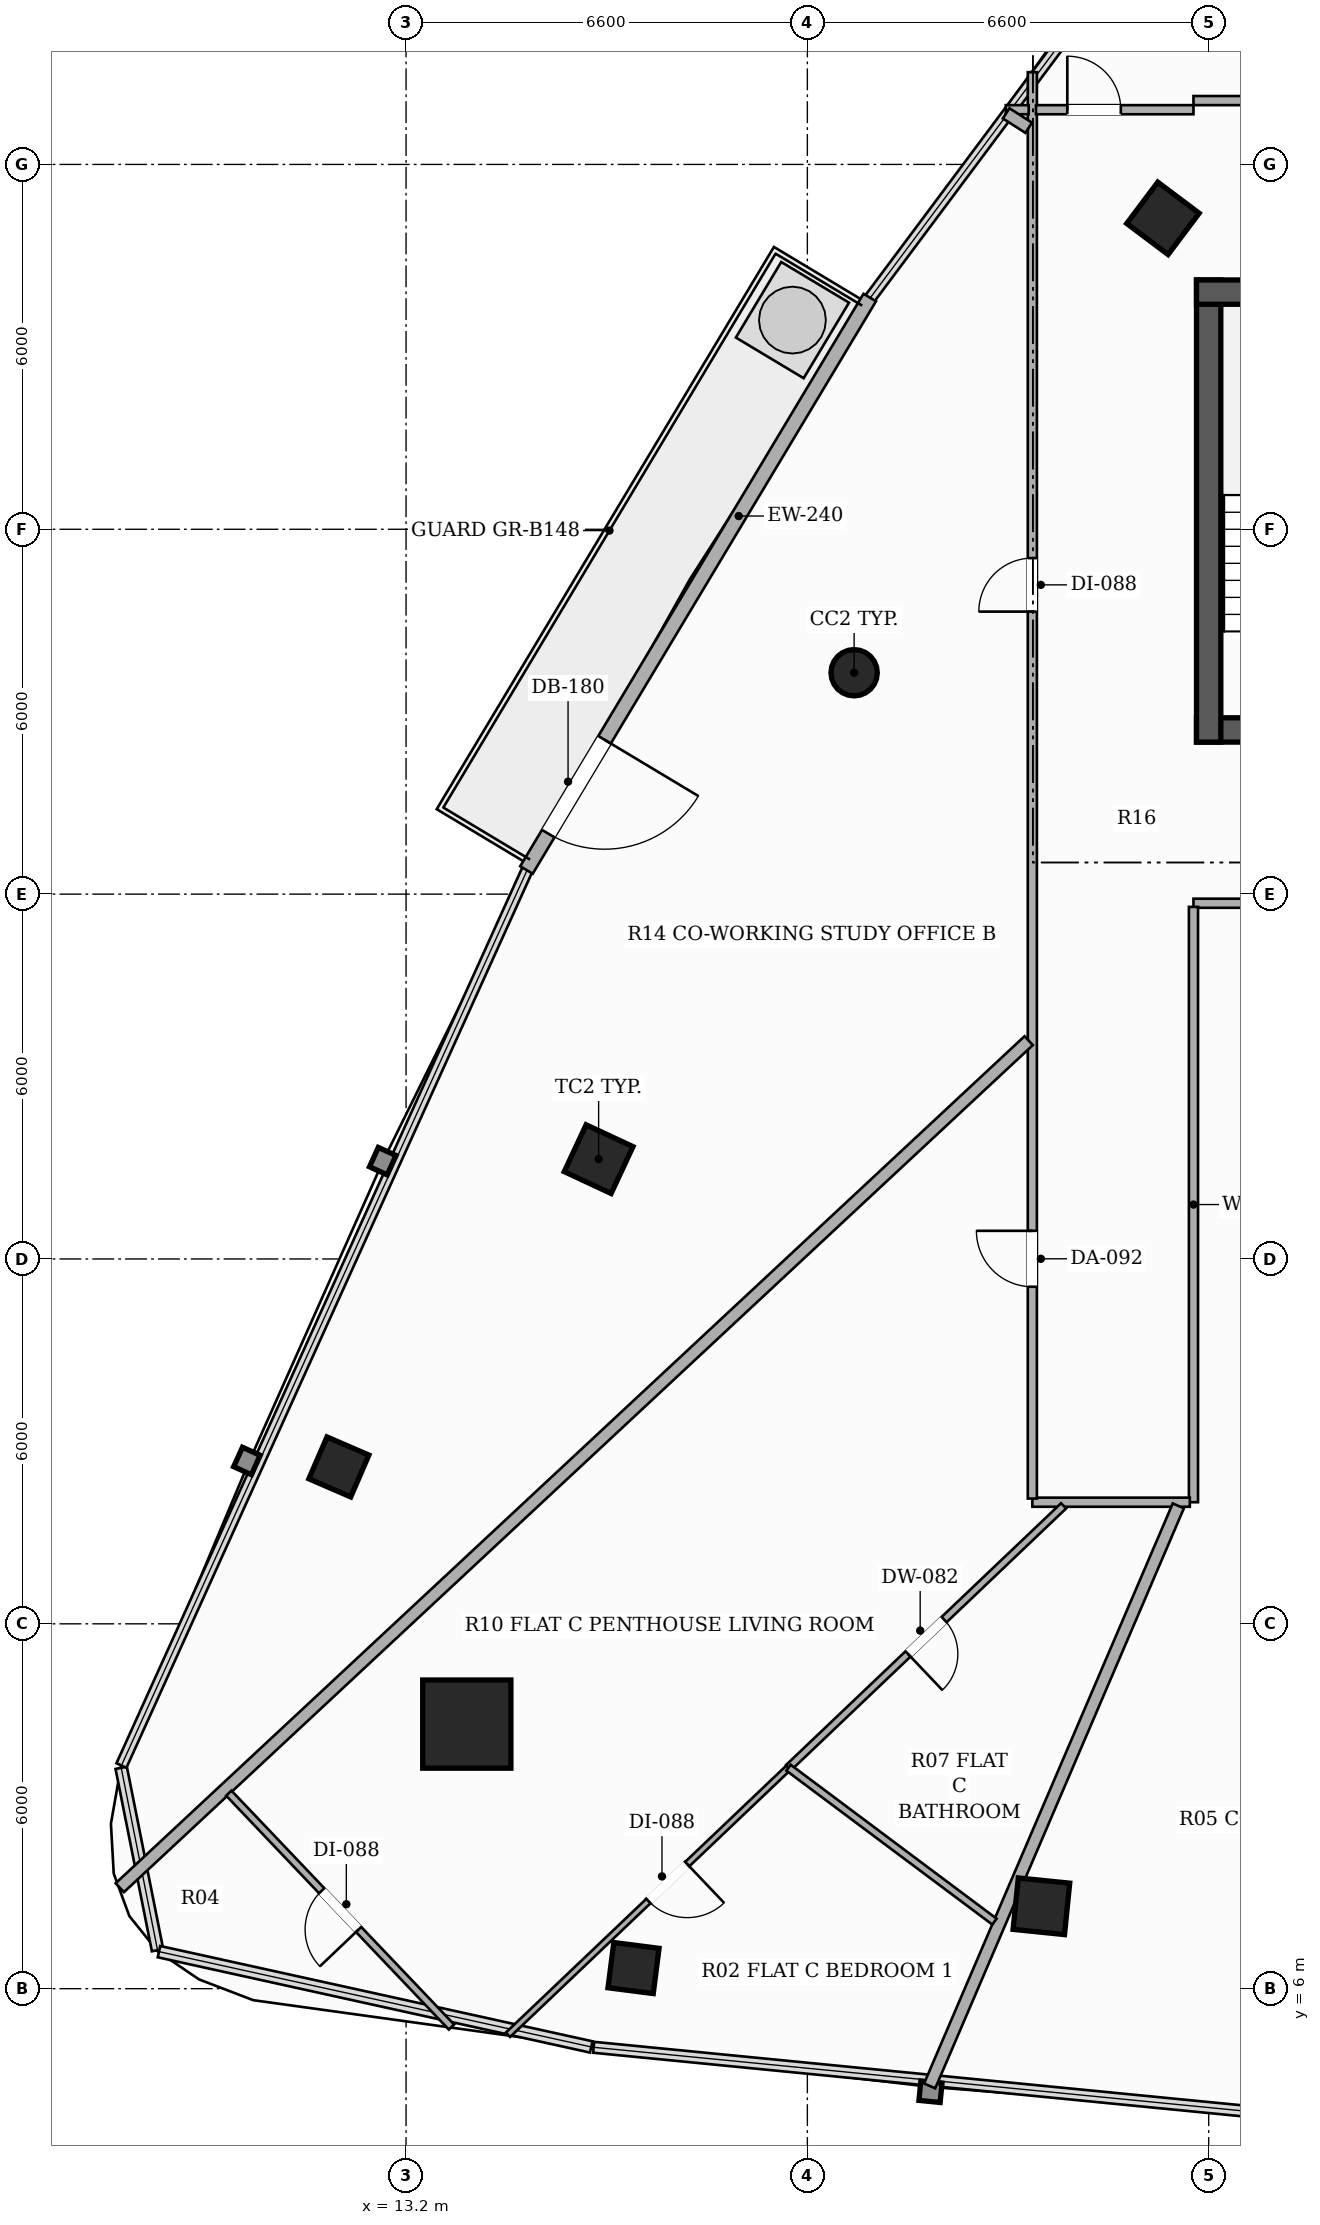
"""IFC4 building model, lengths in metres.
Left out: names, types, materials, properties, quantities, classifications, styles, units other than length and angle.
Written with IfcOpenShell. Run it as: python <this file> out.ifc"""

import sys

from ifc_helpers import new_model, si_unit, direction, frame, frame_2d, origin, origin_2d, place, context, subcontext, project, spatial, rectangle, hollow_rectangle, hollow_circle, extrude, element, fill, save


model = new_model("IFC4")
c1 = context("Model", 3, precision=1e-05, world=origin(), true_north=direction((0.0, 1.0)))
c2 = subcontext(c1, "Body", "Model", "MODEL_VIEW")
j1 = project(units=[si_unit("LENGTHUNIT", "METRE"), si_unit("PLANEANGLEUNIT", "RADIAN")], contexts=[c1])
p1 = place(None, origin())
s1 = spatial("IfcSite", under=j1, at=p1, CompositionType="ELEMENT")
p2 = place(p1, origin())
s2 = spatial("IfcBuilding", under=s1, at=p2, CompositionType="ELEMENT")
p3 = place(p2, frame((0.0, 0.0, 173.75)))
s3 = spatial("IfcBuildingStorey", under=s2, at=p3, CompositionType="ELEMENT", Elevation=173.75)
p4 = place(p3, frame((26.2, 26.7, 0.0), z_axis=(0.0, 0.0, 1.0), x_axis=(1.0, 0.0, 0.0)))
e1 = element("IfcWall", 1, at=p4, inside=s3, PredefinedType="SHEAR", context=c2, shape_type="SweptSolid", body=[
    extrude(rectangle(XDim=13.6, YDim=0.4, at=frame_2d((6.8, 0.0))), origin(), (0.0, 0.0, 1.0), 3.3),
])
p5 = place(p4, frame((4.35, 0.0, 0.0)))
e2 = element("IfcOpeningElement", 2, at=p5, cuts=e1, PredefinedType="OPENING", context=c2, shape_type="SweptSolid", body=[
    extrude(rectangle(XDim=1.05, YDim=2.15, at=frame_2d((0.525, 1.075))), frame((0.0, 0.21, 0.0), z_axis=(0.0, -1.0, 0.0), x_axis=(1.0, 0.0, 0.0)), (0.0, 0.0, 1.0), 0.42),
])
p6 = place(p4, frame((8.3, 0.0, 0.0)))
e3 = element("IfcOpeningElement", 3, at=p6, cuts=e1, PredefinedType="OPENING", context=c2, shape_type="SweptSolid", body=[
    extrude(rectangle(XDim=1.05, YDim=2.15, at=frame_2d((0.525, 1.075))), frame((0.0, 0.21, 0.0), z_axis=(0.0, -1.0, 0.0), x_axis=(1.0, 0.0, 0.0)), (0.0, 0.0, 1.0), 0.42),
])
p7 = place(p3, frame((26.4, 26.5, 0.0), z_axis=(0.0, 0.0, 1.0), x_axis=(0.0, 1.0, 0.0)))
e4 = element("IfcWall", 4, at=p7, inside=s3, PredefinedType="SHEAR", context=c2, shape_type="SweptSolid", body=[
    extrude(rectangle(XDim=7.6, YDim=0.4, at=frame_2d((3.8, 0.0))), origin(), (0.0, 0.0, 1.0), 3.3),
])
p8 = place(p3, frame((26.2, 33.9, 0.0), z_axis=(0.0, 0.0, 1.0), x_axis=(1.0, 0.0, 0.0)))
e5 = element("IfcWall", 5, at=p8, inside=s3, PredefinedType="SHEAR", context=c2, shape_type="SweptSolid", body=[
    extrude(rectangle(XDim=3.68, YDim=0.4, at=frame_2d((1.84, 0.0))), origin(), (0.0, 0.0, 1.0), 3.3),
])
p9 = place(p3, frame((14.199, 10.351, 0.0), z_axis=(0.0, 0.0, 1.0), x_axis=(1.0, 0.0, 0.0)))
e6 = element("IfcColumn", 6, at=p9, inside=s3, PredefinedType="COLUMN", context=c2, shape_type="SweptSolid", body=[
    extrude(hollow_rectangle(XDim=1.45, YDim=1.45, WallThickness=0.045, at=origin_2d()), origin(), (0.0, 0.0, 1.0), 3.3),
])
p10 = place(p3, frame((25.648, 35.113, 0.0), z_axis=(0.0, 0.0, 1.0), x_axis=(0.600420225326, 0.799684658487, 0.0)))
e7 = element("IfcColumn", 7, at=p10, inside=s3, PredefinedType="COLUMN", context=c2, shape_type="SweptSolid", body=[
    extrude(hollow_rectangle(XDim=0.85, YDim=0.85, WallThickness=0.028, at=origin_2d()), origin(), (0.0, 0.0, 1.0), 3.3),
])
p11 = place(p3, frame((20.569, 27.641, 0.0), z_axis=(0.0, 0.0, 1.0), x_axis=(1.0, 0.0, 0.0)))
e8 = element("IfcColumn", 8, at=p11, inside=s3, PredefinedType="COLUMN", context=c2, shape_type="SweptSolid", body=[
    extrude(hollow_circle(Radius=0.381, WallThickness=0.022, at=origin_2d()), origin(), (0.0, 0.0, 1.0), 3.3),
])
for number, where, z_axis, x_axis in (
    (9, (16.367, 19.642, 0.0), (0.0, 0.0, 1.0), (0.423, 0.906, 0.0)),
    (10, (23.649, 7.355, 0.0), (0.0, 0.0, 1.0), (-0.995, 0.101, 0.0)),
):
    element("IfcColumn", number, at=place(p3, frame(where, z_axis=z_axis, x_axis=x_axis)), inside=s3, PredefinedType="COLUMN", context=c2, shape_type="SweptSolid", body=[
        extrude(hollow_rectangle(XDim=0.85, YDim=0.85, WallThickness=0.028, at=origin_2d()), origin(), (0.0, 0.0, 1.0), 3.3),
    ])
for number, where, z_axis, x_axis in (
    (11, (12.095, 14.58, 0.0), (0.0, 0.0, 1.0), (0.397, 0.918, 0.0)),
    (12, (16.941, 6.339, 0.0), (0.0, 0.0, 1.0), (-0.992, 0.127, 0.0)),
):
    element("IfcColumn", number, at=place(p3, frame(where, z_axis=z_axis, x_axis=x_axis)), inside=s3, PredefinedType="COLUMN", context=c2, shape_type="SweptSolid", body=[
        extrude(hollow_rectangle(XDim=0.75, YDim=0.75, WallThickness=0.025, at=origin_2d()), origin(), (0.0, 0.0, 1.0), 3.3),
    ])
p12 = place(p3, frame((20.826, 33.811, 0.0), z_axis=(0.0, 0.0, 1.0), x_axis=(-0.514332213488, -0.857591029669, 0.0)))
e13 = element("IfcWall", 13, at=p12, inside=s3, PredefinedType="SOLIDWALL", context=c2, shape_type="SweptSolid", body=[
    extrude(rectangle(XDim=10.977, YDim=0.24, at=frame_2d((5.489, 0.0))), origin(), (0.0, 0.0, 1.0), 2.624),
])
p13 = place(p12, frame((8.48, 0.0, 0.0)))
e14 = element("IfcOpeningElement", 14, at=p13, cuts=e13, PredefinedType="OPENING", context=c2, shape_type="SweptSolid", body=[
    extrude(rectangle(XDim=1.8, YDim=2.2, at=frame_2d((0.9, 1.1))), frame((0.0, 0.13, 0.0), z_axis=(0.0, -1.0, 0.0), x_axis=(1.0, 0.0, 0.0)), (0.0, 0.0, 1.0), 0.26),
])
p14 = place(p3, frame((31.935, 23.85, 0.0), z_axis=(0.0, 0.0, 1.0), x_axis=(-1.0, 0.0, 0.0)))
e15 = element("IfcWall", 15, at=p14, inside=s3, PredefinedType="PARTITIONING", context=c2, shape_type="SweptSolid", body=[
    extrude(rectangle(XDim=5.785, YDim=0.15, at=frame_2d((2.893, 0.0))), origin(), (0.0, 0.0, 1.0), 2.721),
])
p15 = place(p14, frame((0.905, 0.0, 0.0)))
e16 = element("IfcOpeningElement", 16, at=p15, cuts=e15, PredefinedType="OPENING", context=c2, shape_type="SweptSolid", body=[
    extrude(rectangle(XDim=0.88, YDim=2.1, at=frame_2d((0.44, 1.05))), frame((0.0, 0.085, 0.0), z_axis=(0.0, -1.0, 0.0), x_axis=(1.0, 0.0, 0.0)), (0.0, 0.0, 1.0), 0.17),
])
p16 = place(p3, frame((26.15, 23.79, 0.0), z_axis=(0.0, 0.0, 1.0), x_axis=(0.0, -1.0, 0.0)))
e17 = element("IfcWall", 17, at=p16, inside=s3, PredefinedType="PARTITIONING", context=c2, shape_type="SweptSolid", body=[
    extrude(rectangle(XDim=9.79, YDim=0.15, at=frame_2d((4.895, 0.0))), origin(), (0.0, 0.0, 1.0), 2.721),
])
p17 = place(p3, frame((26.09, 14.0, 0.0), z_axis=(0.0, 0.0, 1.0), x_axis=(-1.0, 0.0, 0.0)))
e18 = element("IfcWall", 18, at=p17, inside=s3, PredefinedType="PARTITIONING", context=c2, shape_type="SweptSolid", body=[
    extrude(rectangle(XDim=2.59, YDim=0.15, at=frame_2d((1.295, 0.0))), origin(), (0.0, 0.0, 1.0), 2.721),
])
p18 = place(p3, frame((23.5, 14.06, 0.0), z_axis=(0.0, 0.0, 1.0), x_axis=(0.0, 1.0, 0.0)))
e19 = element("IfcWall", 19, at=p18, inside=s3, PredefinedType="PARTITIONING", context=c2, shape_type="SweptSolid", body=[
    extrude(rectangle(XDim=23.457, YDim=0.15, at=frame_2d((11.729, 0.0))), origin(), (0.0, 0.0, 1.0), 2.413),
])
p19 = place(p18, frame((14.586, 0.0, 0.0)))
e20 = element("IfcOpeningElement", 20, at=p19, cuts=e19, PredefinedType="OPENING", context=c2, shape_type="SweptSolid", body=[
    extrude(rectangle(XDim=0.88, YDim=2.1, at=frame_2d((0.44, 1.05))), frame((0.0, 0.085, 0.0), z_axis=(0.0, -1.0, 0.0), x_axis=(1.0, 0.0, 0.0)), (0.0, 0.0, 1.0), 0.17),
])
p20 = place(p18, frame((3.483, 0.0, 0.0)))
e21 = element("IfcOpeningElement", 21, at=p20, cuts=e19, PredefinedType="OPENING", context=c2, shape_type="SweptSolid", body=[
    extrude(rectangle(XDim=0.92, YDim=2.15, at=frame_2d((0.46, 1.075))), frame((0.0, 0.085, 0.0), z_axis=(0.0, -1.0, 0.0), x_axis=(1.0, 0.0, 0.0)), (0.0, 0.0, 1.0), 0.17),
])
p21 = place(p3, frame((23.063, 36.9, 0.0), z_axis=(0.0, 0.0, 1.0), x_axis=(1.0, 0.0, 0.0)))
e22 = element("IfcWall", 22, at=p21, inside=s3, PredefinedType="PARTITIONING", context=c2, shape_type="SweptSolid", body=[
    extrude(rectangle(XDim=0.377, YDim=0.15, at=frame_2d((0.188, 0.0))), origin(), (0.0, 0.0, 1.0), 3.06),
])
p22 = place(p3, frame((23.56, 36.9, 0.0), z_axis=(0.0, 0.0, 1.0), x_axis=(1.0, 0.0, 0.0)))
e23 = element("IfcWall", 23, at=p22, inside=s3, PredefinedType="PARTITIONING", context=c2, shape_type="SweptSolid", body=[
    extrude(rectangle(XDim=2.59, YDim=0.15, at=frame_2d((1.295, 0.0))), origin(), (0.0, 0.0, 1.0), 2.413),
])
p23 = place(p22, frame((0.515, 0.0, 0.0)))
e24 = element("IfcOpeningElement", 24, at=p23, cuts=e23, PredefinedType="OPENING", context=c2, shape_type="SweptSolid", body=[
    extrude(rectangle(XDim=0.88, YDim=2.1, at=frame_2d((0.44, 1.05))), frame((0.0, 0.085, 0.0), z_axis=(0.0, -1.0, 0.0), x_axis=(1.0, 0.0, 0.0)), (0.0, 0.0, 1.0), 0.17),
])
p24 = place(p3, frame((26.15, 37.05, 0.0), z_axis=(0.0, 0.0, 1.0), x_axis=(1.0, 0.0, 0.0)))
e25 = element("IfcWall", 25, at=p24, inside=s3, PredefinedType="PARTITIONING", context=c2, shape_type="SweptSolid", body=[
    extrude(rectangle(XDim=2.0, YDim=0.15, at=frame_2d((1.0, 0.0))), origin(), (0.0, 0.0, 1.0), 2.413),
])
p25 = place(p3, frame((23.44, 21.59, 0.0), z_axis=(0.0, 0.0, 1.0), x_axis=(-0.731574776166, -0.681761209572, 0.0)))
e26 = element("IfcWall", 26, at=p25, inside=s3, PredefinedType="PARTITIONING", context=c2, shape_type="SweptSolid", body=[
    extrude(rectangle(XDim=20.433, YDim=0.2, at=frame_2d((10.216, 0.0))), origin(), (0.0, 0.0, 1.0), 2.413),
])
p26 = place(p3, frame((23.069, 36.84, 0.0), z_axis=(0.0, 0.0, 1.0), x_axis=(0.842563414195, -0.538597152852, 0.0)))
e27 = element("IfcWall", 27, at=p26, inside=s3, PredefinedType="PARTITIONING", context=c2, shape_type="SweptSolid", body=[
    extrude(rectangle(XDim=0.44, YDim=0.2, at=frame_2d((0.22, 0.0))), origin(), (0.0, 0.0, 1.0), 3.06),
])
p27 = place(p3, frame((25.901, 13.94, 0.0), z_axis=(0.0, 0.0, 1.0), x_axis=(-0.394055564824, -0.919086618242, 0.0)))
e28 = element("IfcWall", 28, at=p27, inside=s3, PredefinedType="PARTITIONING", context=c2, shape_type="SweptSolid", body=[
    extrude(rectangle(XDim=10.379, YDim=0.2, at=frame_2d((5.189, 0.0))), origin(), (0.0, 0.0, 1.0), 2.413),
])
p28 = place(p3, frame((24.014, 13.94, 0.0), z_axis=(0.0, 0.0, 1.0), x_axis=(-0.724345202964, -0.68943747138, 0.0)))
e29 = element("IfcWall", 29, at=p28, inside=s3, PredefinedType="PARTITIONING", context=c2, shape_type="SweptSolid", body=[
    extrude(rectangle(XDim=6.246, YDim=0.12, at=frame_2d((3.123, 0.0))), origin(), (0.0, 0.0, 1.0), 2.721),
])
p29 = place(p28, frame((2.713, 0.0, 0.0)))
e30 = element("IfcOpeningElement", 30, at=p29, cuts=e29, PredefinedType="OPENING", context=c2, shape_type="SweptSolid", body=[
    extrude(rectangle(XDim=0.82, YDim=2.1, at=frame_2d((0.41, 1.05))), frame((0.0, 0.07, 0.0), z_axis=(0.0, -1.0, 0.0), x_axis=(1.0, 0.0, 0.0)), (0.0, 0.0, 1.0), 0.14),
])
p30 = place(p3, frame((13.947, 5.369, 0.0), z_axis=(0.0, 0.0, 1.0), x_axis=(-0.689563334415, 0.724225384691, 0.0)))
e31 = element("IfcWall", 31, at=p30, inside=s3, PredefinedType="PARTITIONING", context=c2, shape_type="SweptSolid", body=[
    extrude(rectangle(XDim=5.311, YDim=0.12, at=frame_2d((2.655, 0.0))), origin(), (0.0, 0.0, 1.0), 3.06),
])
p31 = place(p30, frame((2.215, 0.0, 0.0)))
e32 = element("IfcOpeningElement", 32, at=p31, cuts=e31, PredefinedType="OPENING", context=c2, shape_type="SweptSolid", body=[
    extrude(rectangle(XDim=0.88, YDim=2.1, at=frame_2d((0.44, 1.05))), frame((0.0, 0.07, 0.0), z_axis=(0.0, -1.0, 0.0), x_axis=(1.0, 0.0, 0.0)), (0.0, 0.0, 1.0), 0.14),
])
p32 = place(p3, frame((19.49, 9.634, 0.0), z_axis=(0.0, 0.0, 1.0), x_axis=(-0.724311078703, -0.68947332165, 0.0)))
e33 = element("IfcWall", 33, at=p32, inside=s3, PredefinedType="PARTITIONING", context=c2, shape_type="SweptSolid", body=[
    extrude(rectangle(XDim=6.37, YDim=0.1, at=frame_2d((3.185, 0.0))), origin(), (0.0, 0.0, 1.0), 2.413),
])
p33 = place(p32, frame((2.3, 0.0, 0.0)))
e34 = element("IfcOpeningElement", 34, at=p33, cuts=e33, PredefinedType="OPENING", context=c2, shape_type="SweptSolid", body=[
    extrude(rectangle(XDim=0.88, YDim=2.1, at=frame_2d((0.44, 1.05))), frame((0.0, 0.06, 0.0), z_axis=(0.0, -1.0, 0.0), x_axis=(1.0, 0.0, 0.0)), (0.0, 0.0, 1.0), 0.12),
])
p34 = place(p3, frame((22.877, 7.103, 0.0), z_axis=(0.0, 0.0, 1.0), x_axis=(-0.801045056039, 0.598604057951, 0.0)))
e35 = element("IfcWall", 35, at=p34, inside=s3, PredefinedType="PARTITIONING", context=c2, shape_type="SweptSolid", body=[
    extrude(rectangle(XDim=4.228, YDim=0.12, at=frame_2d((2.114, 0.0))), origin(), (0.0, 0.0, 1.0), 2.413),
])
p35 = place(p13, origin())
e36 = element("IfcDoor", 36, at=p35, inside=s3, OperationType="SINGLE_SWING_LEFT", PredefinedType="DOOR", context=c2, shape_type="SweptSolid", body=[
    extrude(rectangle(XDim=1.8, YDim=2.2, at=frame_2d((0.9, 1.1))), frame((0.0, 0.025, 0.0), z_axis=(0.0, -1.0, 0.0), x_axis=(1.0, 0.0, 0.0)), (0.0, 0.0, 1.0), 0.05),
])
fill(e14, e36)
p36 = place(p19, origin())
e37 = element("IfcDoor", 37, at=p36, inside=s3, OperationType="SINGLE_SWING_LEFT", PredefinedType="DOOR", context=c2, shape_type="SweptSolid", body=[
    extrude(rectangle(XDim=0.88, YDim=2.1, at=frame_2d((0.44, 1.05))), frame((0.0, 0.025, 0.0), z_axis=(0.0, -1.0, 0.0), x_axis=(1.0, 0.0, 0.0)), (0.0, 0.0, 1.0), 0.05),
])
fill(e20, e37)
p37 = place(p20, origin())
e38 = element("IfcDoor", 38, at=p37, inside=s3, OperationType="SINGLE_SWING_RIGHT", PredefinedType="DOOR", context=c2, shape_type="SweptSolid", body=[
    extrude(rectangle(XDim=0.92, YDim=2.15, at=frame_2d((0.46, 1.075))), frame((0.0, 0.025, 0.0), z_axis=(0.0, -1.0, 0.0), x_axis=(1.0, 0.0, 0.0)), (0.0, 0.0, 1.0), 0.05),
])
fill(e21, e38)
p38 = place(p29, origin())
e39 = element("IfcDoor", 39, at=p38, inside=s3, OperationType="SINGLE_SWING_RIGHT", PredefinedType="DOOR", context=c2, shape_type="SweptSolid", body=[
    extrude(rectangle(XDim=0.82, YDim=2.1, at=frame_2d((0.41, 1.05))), frame((0.0, 0.025, 0.0), z_axis=(0.0, -1.0, 0.0), x_axis=(1.0, 0.0, 0.0)), (0.0, 0.0, 1.0), 0.05),
])
fill(e30, e39)
p39 = place(p31, origin())
e40 = element("IfcDoor", 40, at=p39, inside=s3, OperationType="SINGLE_SWING_LEFT", PredefinedType="DOOR", context=c2, shape_type="SweptSolid", body=[
    extrude(rectangle(XDim=0.88, YDim=2.1, at=frame_2d((0.44, 1.05))), frame((0.0, 0.025, 0.0), z_axis=(0.0, -1.0, 0.0), x_axis=(1.0, 0.0, 0.0)), (0.0, 0.0, 1.0), 0.05),
])
fill(e32, e40)
p40 = place(p33, origin())
e41 = element("IfcDoor", 41, at=p40, inside=s3, OperationType="SINGLE_SWING_LEFT", PredefinedType="DOOR", context=c2, shape_type="SweptSolid", body=[
    extrude(rectangle(XDim=0.88, YDim=2.1, at=frame_2d((0.44, 1.05))), frame((0.0, 0.025, 0.0), z_axis=(0.0, -1.0, 0.0), x_axis=(1.0, 0.0, 0.0)), (0.0, 0.0, 1.0), 0.05),
])
fill(e34, e41)
p41 = place(p23, origin())
e42 = element("IfcDoor", 42, at=p41, inside=s3, OperationType="SINGLE_SWING_LEFT", PredefinedType="DOOR", context=c2, shape_type="SweptSolid", body=[
    extrude(rectangle(XDim=0.88, YDim=2.1, at=frame_2d((0.44, 1.05))), frame((0.0, 0.025, 0.0), z_axis=(0.0, -1.0, 0.0), x_axis=(1.0, 0.0, 0.0)), (0.0, 0.0, 1.0), 0.05),
])
fill(e24, e42)
save(model, sys.argv[1])
